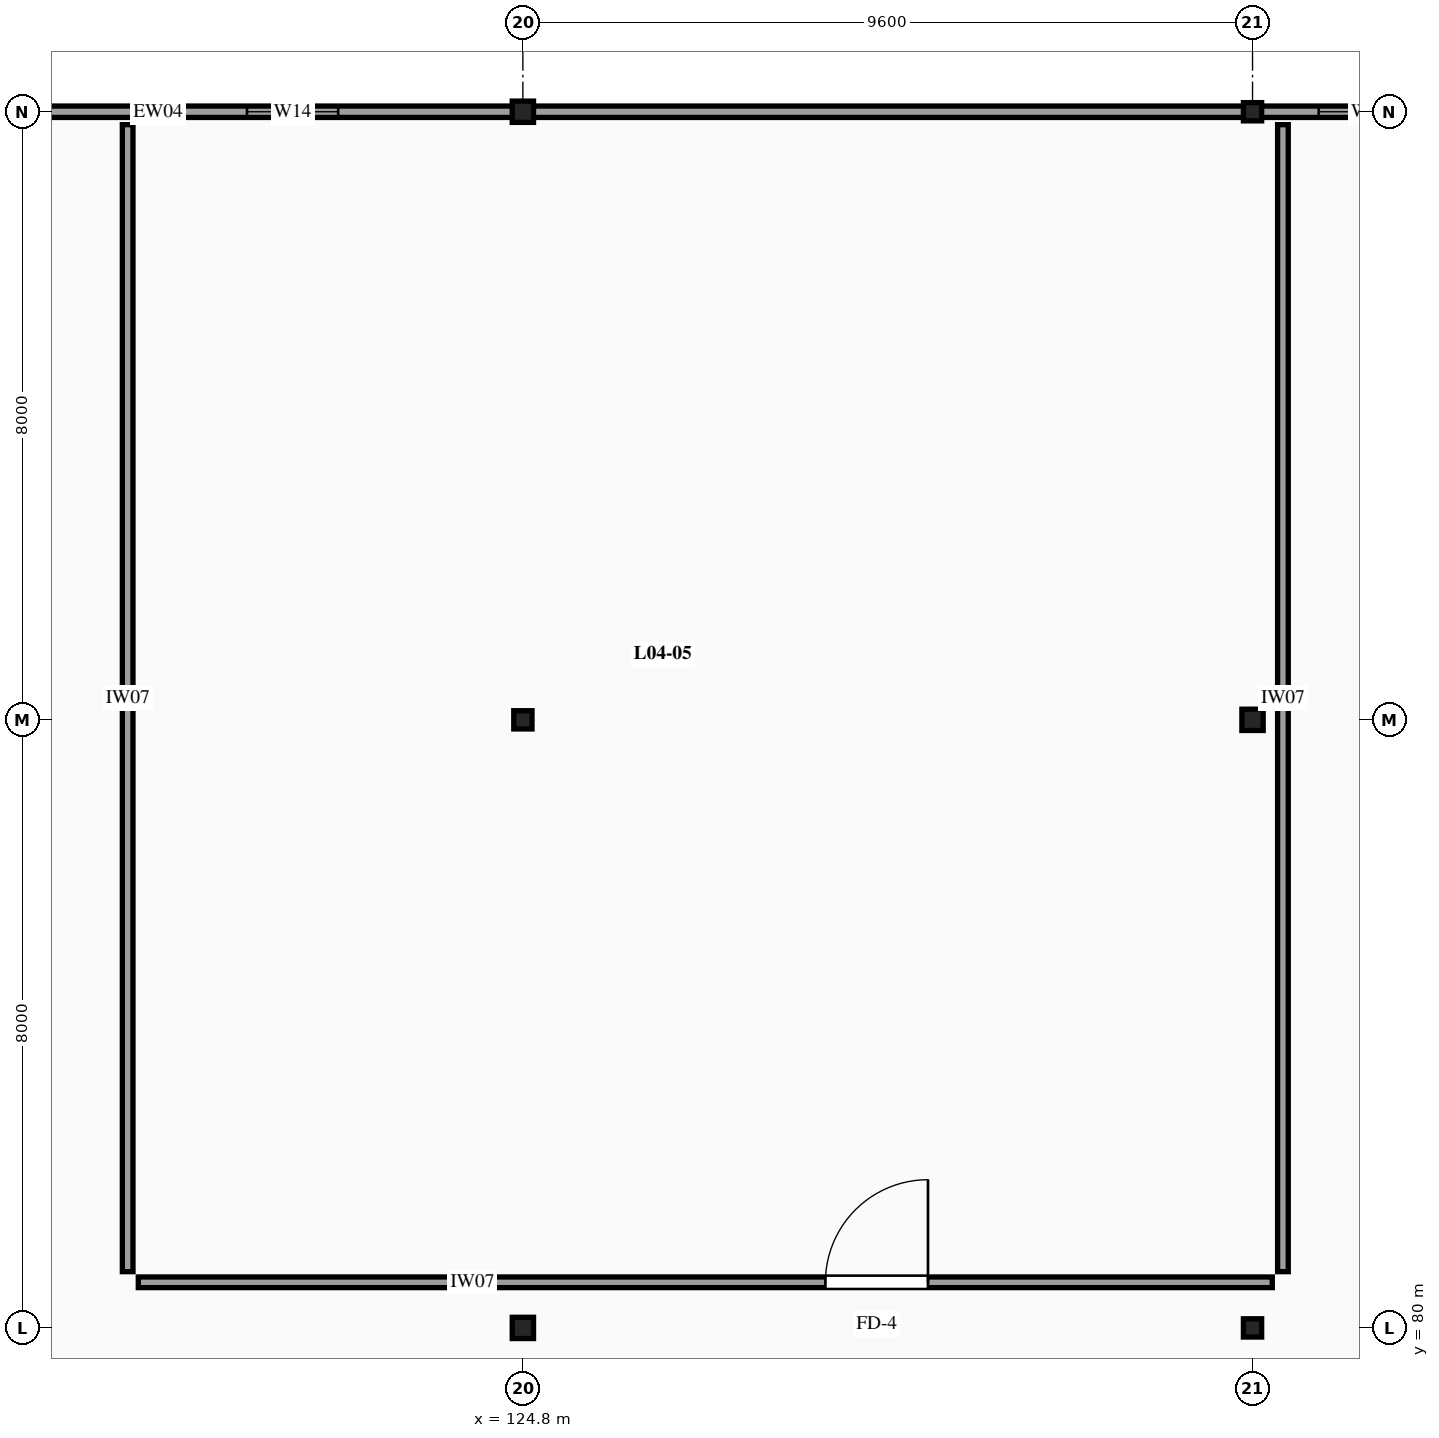
"""IFC4 building model, lengths in metres.
Left out: names, types, materials, properties, quantities, classifications, styles, units other than length and angle.
Written with IfcOpenShell. Run it as: python <this file> out.ifc"""

import sys

from ifc_helpers import new_model, si_unit, direction, frame, frame_2d, origin, origin_2d, place, context, subcontext, project, spatial, rectangle, i_section, extrude, element, fill, save


model = new_model("IFC4")
c1 = context("Model", 3, precision=1e-05, world=origin(), true_north=direction((0.0, 1.0)))
c2 = subcontext(c1, "Body", "Model", "MODEL_VIEW")
j1 = project(units=[si_unit("LENGTHUNIT", "METRE"), si_unit("PLANEANGLEUNIT", "RADIAN")], contexts=[c1])
p1 = place(None, origin())
s1 = spatial("IfcSite", under=j1, at=p1, CompositionType="ELEMENT")
p2 = place(p1, origin())
s2 = spatial("IfcBuilding", under=s1, at=p2, CompositionType="ELEMENT")
p3 = place(p2, frame((0.0, 0.0, 17.4)))
s3 = spatial("IfcBuildingStorey", under=s2, at=p3, CompositionType="ELEMENT", Elevation=17.4)
p4 = place(p3, frame((124.8, 80.0, -0.28), z_axis=(0.0, 0.0, 1.0), x_axis=(1.0, 0.0, 0.0)))
e1 = element("IfcColumn", 1, at=p4, inside=s3, PredefinedType="COLUMN", context=c2, shape_type="SweptSolid", body=[
    extrude(i_section(OverallWidth=0.28, OverallDepth=0.28, WebThickness=0.01, FlangeThickness=0.018, FilletRadius=0.024, at=origin_2d()), origin(), (0.0, 0.0, 1.0), 8.43),
])
p5 = place(p3, frame((124.8, 88.0, -0.28), z_axis=(0.0, 0.0, 1.0), x_axis=(1.0, 0.0, 0.0)))
e2 = element("IfcColumn", 2, at=p5, inside=s3, PredefinedType="COLUMN", context=c2, shape_type="SweptSolid", body=[
    extrude(i_section(OverallWidth=0.24, OverallDepth=0.24, WebThickness=0.01, FlangeThickness=0.017, FilletRadius=0.021, at=origin_2d()), origin(), (0.0, 0.0, 1.0), 8.43),
])
p6 = place(p3, frame((124.8, 96.0, -0.28), z_axis=(0.0, 0.0, 1.0), x_axis=(1.0, 0.0, 0.0)))
e3 = element("IfcColumn", 3, at=p6, inside=s3, PredefinedType="COLUMN", context=c2, shape_type="SweptSolid", body=[
    extrude(i_section(OverallWidth=0.28, OverallDepth=0.28, WebThickness=0.01, FlangeThickness=0.018, FilletRadius=0.024, at=origin_2d()), origin(), (0.0, 0.0, 1.0), 8.43),
])
p7 = place(p3, frame((134.4, 80.0, -0.28), z_axis=(0.0, 0.0, 1.0), x_axis=(1.0, 0.0, 0.0)))
e4 = element("IfcColumn", 4, at=p7, inside=s3, PredefinedType="COLUMN", context=c2, shape_type="SweptSolid", body=[
    extrude(i_section(OverallWidth=0.24, OverallDepth=0.24, WebThickness=0.01, FlangeThickness=0.017, FilletRadius=0.021, at=origin_2d()), origin(), (0.0, 0.0, 1.0), 8.43),
])
p8 = place(p3, frame((134.4, 88.0, -0.28), z_axis=(0.0, 0.0, 1.0), x_axis=(1.0, 0.0, 0.0)))
e5 = element("IfcColumn", 5, at=p8, inside=s3, PredefinedType="COLUMN", context=c2, shape_type="SweptSolid", body=[
    extrude(i_section(OverallWidth=0.28, OverallDepth=0.28, WebThickness=0.01, FlangeThickness=0.018, FilletRadius=0.024, at=origin_2d()), origin(), (0.0, 0.0, 1.0), 8.43),
])
p9 = place(p3, frame((134.4, 96.0, -0.28), z_axis=(0.0, 0.0, 1.0), x_axis=(1.0, 0.0, 0.0)))
e6 = element("IfcColumn", 6, at=p9, inside=s3, PredefinedType="COLUMN", context=c2, shape_type="SweptSolid", body=[
    extrude(i_section(OverallWidth=0.24, OverallDepth=0.24, WebThickness=0.01, FlangeThickness=0.017, FilletRadius=0.021, at=origin_2d()), origin(), (0.0, 0.0, 1.0), 8.43),
])
p10 = place(p3, frame((115.22, 96.0, 0.0), z_axis=(0.0, 0.0, 1.0), x_axis=(1.0, 0.0, 0.0)))
e7 = element("IfcWall", 7, at=p10, inside=s3, PredefinedType="SOLIDWALL", context=c2, shape_type="SweptSolid", body=[
    extrude(rectangle(XDim=9.56, YDim=0.15, at=frame_2d((4.78, 0.0))), origin(), (0.0, 0.0, 1.0), 7.75),
])
p11 = place(p10, frame((0.85, 0.0, 0.85)))
e8 = element("IfcOpeningElement", 8, at=p11, cuts=e7, PredefinedType="OPENING", context=c2, shape_type="SweptSolid", body=[
    extrude(rectangle(XDim=1.2, YDim=1.8, at=frame_2d((0.6, 0.9))), frame((0.0, 0.085, 0.0), z_axis=(0.0, -1.0, 0.0), x_axis=(1.0, 0.0, 0.0)), (0.0, 0.0, 1.0), 0.17),
])
p12 = place(p10, frame((5.95, 0.0, 0.85)))
e9 = element("IfcOpeningElement", 9, at=p12, cuts=e7, PredefinedType="OPENING", context=c2, shape_type="SweptSolid", body=[
    extrude(rectangle(XDim=1.2, YDim=1.8, at=frame_2d((0.6, 0.9))), frame((0.0, 0.085, 0.0), z_axis=(0.0, -1.0, 0.0), x_axis=(1.0, 0.0, 0.0)), (0.0, 0.0, 1.0), 0.17),
])
p13 = place(p3, frame((124.82, 96.0, 0.0), z_axis=(0.0, 0.0, 1.0), x_axis=(1.0, 0.0, 0.0)))
e10 = element("IfcWall", 10, at=p13, inside=s3, PredefinedType="SOLIDWALL", context=c2, shape_type="SweptSolid", body=[
    extrude(rectangle(XDim=9.56, YDim=0.15, at=frame_2d((4.78, 0.0))), origin(), (0.0, 0.0, 1.0), 7.75),
])
p14 = place(p3, frame((134.42, 96.0, 0.0), z_axis=(0.0, 0.0, 1.0), x_axis=(1.0, 0.0, 0.0)))
e11 = element("IfcWall", 11, at=p14, inside=s3, PredefinedType="SOLIDWALL", context=c2, shape_type="SweptSolid", body=[
    extrude(rectangle(XDim=9.56, YDim=0.15, at=frame_2d((4.78, 0.0))), origin(), (0.0, 0.0, 1.0), 7.75),
])
p15 = place(p14, frame((0.85, 0.0, 0.85)))
e12 = element("IfcOpeningElement", 12, at=p15, cuts=e11, PredefinedType="OPENING", context=c2, shape_type="SweptSolid", body=[
    extrude(rectangle(XDim=1.35, YDim=1.7, at=frame_2d((0.675, 0.85))), frame((0.0, 0.085, 0.0), z_axis=(0.0, -1.0, 0.0), x_axis=(1.0, 0.0, 0.0)), (0.0, 0.0, 1.0), 0.17),
])
p16 = place(p14, frame((5.95, 0.0, 0.85)))
e13 = element("IfcOpeningElement", 13, at=p16, cuts=e11, PredefinedType="OPENING", context=c2, shape_type="SweptSolid", body=[
    extrude(rectangle(XDim=1.35, YDim=1.7, at=frame_2d((0.675, 0.85))), frame((0.0, 0.085, 0.0), z_axis=(0.0, -1.0, 0.0), x_axis=(1.0, 0.0, 0.0)), (0.0, 0.0, 1.0), 0.17),
])
p17 = place(p3, frame((119.74, 80.6, 0.0), z_axis=(0.0, 0.0, 1.0), x_axis=(1.0, 0.0, 0.0)))
e14 = element("IfcWall", 14, at=p17, inside=s3, PredefinedType="PARTITIONING", context=c2, shape_type="SweptSolid", body=[
    extrude(rectangle(XDim=14.92, YDim=0.14, at=frame_2d((7.46, 0.0))), origin(), (0.0, 0.0, 1.0), 7.5),
])
p18 = place(p17, frame((9.04, 0.0, 0.0)))
e15 = element("IfcOpeningElement", 15, at=p18, cuts=e14, PredefinedType="OPENING", context=c2, shape_type="SweptSolid", body=[
    extrude(rectangle(XDim=1.35, YDim=2.2, at=frame_2d((0.675, 1.1))), frame((0.0, 0.08, 0.0), z_axis=(0.0, -1.0, 0.0), x_axis=(1.0, 0.0, 0.0)), (0.0, 0.0, 1.0), 0.16),
])
for number, where, z_axis, x_axis in (
    (16, (119.6, 80.74, 0.0), (0.0, 0.0, 1.0), (0.0, 1.0, 0.0)),
    (17, (134.8, 80.74, 0.0), (0.0, 0.0, 1.0), (0.0, 1.0, 0.0)),
):
    element("IfcWall", number, at=place(p3, frame(where, z_axis=z_axis, x_axis=x_axis)), inside=s3, PredefinedType="PARTITIONING", context=c2, shape_type="SweptSolid", body=[
        extrude(rectangle(XDim=15.09, YDim=0.14, at=frame_2d((7.545, 0.0))), origin(), (0.0, 0.0, 1.0), 7.5),
    ])
p19 = place(p12, origin())
e18 = element("IfcWindow", 18, at=p19, inside=s3, PartitioningType="SINGLE_PANEL", PredefinedType="WINDOW", context=c2, shape_type="SweptSolid", body=[
    extrude(rectangle(XDim=1.2, YDim=1.8, at=frame_2d((0.6, 0.9))), frame((0.0, 0.03, 0.0), z_axis=(0.0, -1.0, 0.0), x_axis=(1.0, 0.0, 0.0)), (0.0, 0.0, 1.0), 0.06),
])
fill(e9, e18)
p20 = place(p15, origin())
e19 = element("IfcWindow", 19, at=p20, inside=s3, PartitioningType="SINGLE_PANEL", PredefinedType="WINDOW", context=c2, shape_type="SweptSolid", body=[
    extrude(rectangle(XDim=1.35, YDim=1.7, at=frame_2d((0.675, 0.85))), frame((0.0, 0.03, 0.0), z_axis=(0.0, -1.0, 0.0), x_axis=(1.0, 0.0, 0.0)), (0.0, 0.0, 1.0), 0.06),
])
fill(e12, e19)
p21 = place(p18, origin())
e20 = element("IfcDoor", 20, at=p21, inside=s3, OperationType="SINGLE_SWING_RIGHT", PredefinedType="DOOR", context=c2, shape_type="SweptSolid", body=[
    extrude(rectangle(XDim=1.35, YDim=2.2, at=frame_2d((0.675, 1.1))), frame((0.0, 0.025, 0.0), z_axis=(0.0, -1.0, 0.0), x_axis=(1.0, 0.0, 0.0)), (0.0, 0.0, 1.0), 0.05),
])
fill(e15, e20)
save(model, sys.argv[1])
